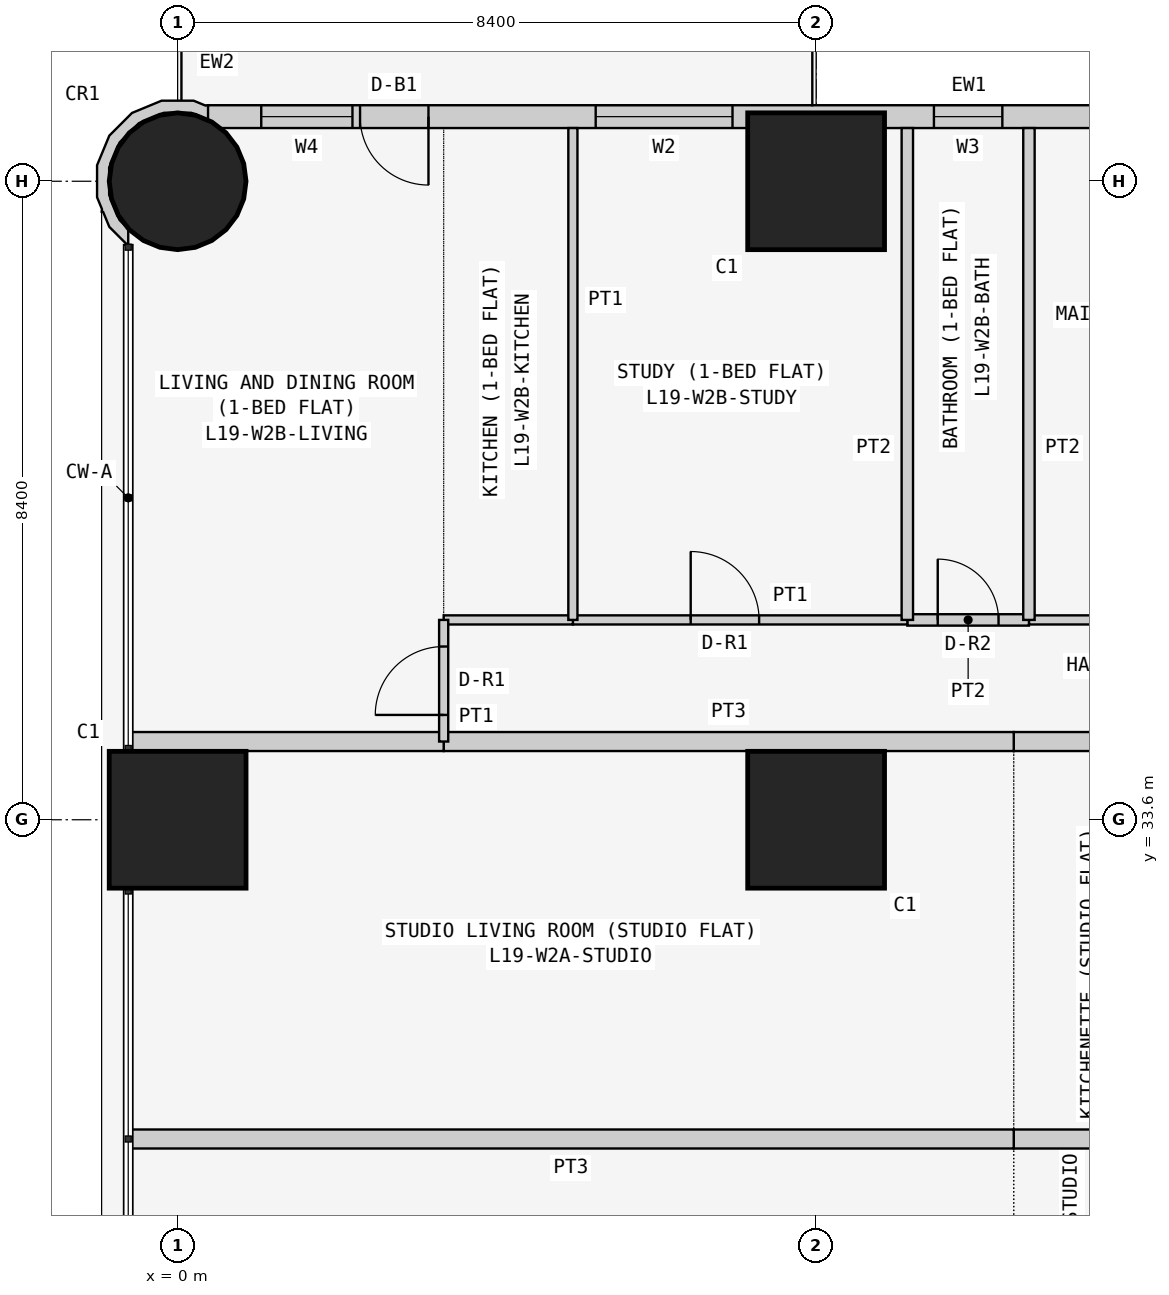
"""IFC4 building model, lengths in metres.
Left out: names, types, materials, properties, quantities, classifications, styles, units other than length and angle.
Written with IfcOpenShell. Run it as: python <this file> out.ifc"""

import sys

from ifc_helpers import new_model, si_unit, direction, frame, frame_2d, origin, origin_2d, place, context, subcontext, project, spatial, polyline, rectangle, circle, outline, extrude, element, fill, save


model = new_model("IFC4")
c1 = context("Model", 3, precision=1e-05, world=origin(), true_north=direction((0.0, 1.0)))
c2 = subcontext(c1, "Body", "Model", "MODEL_VIEW")
j1 = project(units=[si_unit("LENGTHUNIT", "METRE"), si_unit("PLANEANGLEUNIT", "RADIAN")], contexts=[c1])
p1 = place(None, origin())
s1 = spatial("IfcSite", under=j1, at=p1, CompositionType="ELEMENT")
p2 = place(p1, origin())
s2 = spatial("IfcBuilding", under=s1, at=p2, CompositionType="ELEMENT")
p3 = place(p2, frame((0.0, 0.0, 77.7)))
s3 = spatial("IfcBuildingStorey", under=s2, at=p3, CompositionType="ELEMENT", Elevation=77.7)
p4 = place(p3, frame((0.0, 33.6, 0.0), z_axis=(0.0, 0.0, 1.0), x_axis=(1.0, 0.0, 0.0)))
e1 = element("IfcColumn", 1, at=p4, inside=s3, PredefinedType="COLUMN", context=c2, shape_type="SweptSolid", body=[
    extrude(rectangle(XDim=1.8, YDim=1.8, at=origin_2d()), origin(), (0.0, 0.0, 1.0), 3.6),
])
p5 = place(p3, frame((0.0, 42.0, 0.0), z_axis=(0.0, 0.0, 1.0), x_axis=(1.0, 0.0, 0.0)))
e2 = element("IfcColumn", 2, at=p5, inside=s3, PredefinedType="COLUMN", context=c2, shape_type="SweptSolid", body=[
    extrude(circle(Radius=0.9, at=origin_2d()), origin(), (0.0, 0.0, 1.0), 3.6),
])
for number, where, z_axis, x_axis in (
    (3, (8.4, 33.6, 0.0), (0.0, 0.0, 1.0), (1.0, 0.0, 0.0)),
    (4, (8.4, 42.0, 0.0), (0.0, 0.0, 1.0), (1.0, 0.0, 0.0)),
):
    element("IfcColumn", number, at=place(p3, frame(where, z_axis=z_axis, x_axis=x_axis)), inside=s3, PredefinedType="COLUMN", context=c2, shape_type="SweptSolid", body=[
        extrude(rectangle(XDim=1.8, YDim=1.8, at=origin_2d()), origin(), (0.0, 0.0, 1.0), 3.6),
    ])
p6 = place(p3, frame((15.8, 42.85, 0.0), z_axis=(0.0, 0.0, 1.0), x_axis=(-1.0, 0.0, 0.0)))
e5 = element("IfcWall", 5, at=p6, inside=s3, PredefinedType="SOLIDWALL", context=c2, shape_type="SweptSolid", body=[
    extrude(rectangle(XDim=15.4, YDim=0.3, at=frame_2d((7.7, 0.0))), origin(), (0.0, 0.0, 1.0), 3.45),
])
p7 = place(p6, frame((1.2, 0.0, 0.9)))
e6 = element("IfcOpeningElement", 6, at=p7, cuts=e5, PredefinedType="OPENING", context=c2, shape_type="SweptSolid", body=[
    extrude(rectangle(XDim=1.8, YDim=1.5, at=frame_2d((0.9, 0.75))), frame((0.0, 0.16, 0.0), z_axis=(0.0, -1.0, 0.0), x_axis=(1.0, 0.0, 0.0)), (0.0, 0.0, 1.0), 0.32),
])
p8 = place(p6, frame((4.95, 0.0, 1.5)))
e7 = element("IfcOpeningElement", 7, at=p8, cuts=e5, PredefinedType="OPENING", context=c2, shape_type="SweptSolid", body=[
    extrude(rectangle(XDim=0.9, YDim=0.7, at=frame_2d((0.45, 0.35))), frame((0.0, 0.16, 0.0), z_axis=(0.0, -1.0, 0.0), x_axis=(1.0, 0.0, 0.0)), (0.0, 0.0, 1.0), 0.32),
])
p9 = place(p6, frame((8.5, 0.0, 0.9)))
e8 = element("IfcOpeningElement", 8, at=p9, cuts=e5, PredefinedType="OPENING", context=c2, shape_type="SweptSolid", body=[
    extrude(rectangle(XDim=1.8, YDim=1.5, at=frame_2d((0.9, 0.75))), frame((0.0, 0.16, 0.0), z_axis=(0.0, -1.0, 0.0), x_axis=(1.0, 0.0, 0.0)), (0.0, 0.0, 1.0), 0.32),
])
p10 = place(p6, frame((12.5, 0.0, 0.0)))
e9 = element("IfcOpeningElement", 9, at=p10, cuts=e5, PredefinedType="OPENING", context=c2, shape_type="SweptSolid", body=[
    extrude(rectangle(XDim=0.9, YDim=2.4, at=frame_2d((0.45, 1.2))), frame((0.0, 0.16, 0.0), z_axis=(0.0, -1.0, 0.0), x_axis=(1.0, 0.0, 0.0)), (0.0, 0.0, 1.0), 0.32),
])
p11 = place(p6, frame((13.5, 0.0, 0.9)))
e10 = element("IfcOpeningElement", 10, at=p11, cuts=e5, PredefinedType="OPENING", context=c2, shape_type="SweptSolid", body=[
    extrude(rectangle(XDim=1.2, YDim=1.5, at=frame_2d((0.6, 0.75))), frame((0.0, 0.16, 0.0), z_axis=(0.0, -1.0, 0.0), x_axis=(1.0, 0.0, 0.0)), (0.0, 0.0, 1.0), 0.32),
])
p12 = place(p3, frame((0.364, 42.91, 0.0), z_axis=(0.0, 0.0, 1.0), x_axis=(-0.926129809145, 0.377204953059, 0.0)))
e11 = element("IfcWall", 11, at=p12, inside=s3, PredefinedType="SOLIDWALL", context=c2, shape_type="SweptSolid", body=[
    extrude(outline(polyline([(0.36, 1.803), (0.509, 1.741), (0.761, 1.486), (0.896, 1.154), (0.894, 0.795), (0.755, 0.465), (0.5, 0.213), (0.168, 0.078), (-0.1, 0.08), (0.001, -0.097), (0.03, -0.08), (0.199, -0.081), (0.589, 0.078), (0.889, 0.374), (1.053, 0.763), (1.055, 1.185), (0.896, 1.575), (0.778, 1.695), (0.769, 1.728), (0.75, 1.723), (0.6, 1.875), (0.295, 2.003), (0.281, 1.998), (0.36, 1.803)])), origin(), (0.0, 0.0, 1.0), 3.45),
])
p13 = place(p3, frame((13.4, 29.4, 0.0), z_axis=(0.0, 0.0, 1.0), x_axis=(-1.0, 0.0, 0.0)))
e12 = element("IfcWall", 12, at=p13, inside=s3, PredefinedType="PARTITIONING", context=c2, shape_type="SweptSolid", body=[
    extrude(rectangle(XDim=2.4, YDim=0.25, at=frame_2d((1.2, 0.0))), origin(), (0.0, 0.0, 1.0), 3.45),
])
p14 = place(p3, frame((11.0, 29.4, 0.0), z_axis=(0.0, 0.0, 1.0), x_axis=(-1.0, 0.0, 0.0)))
e13 = element("IfcWall", 13, at=p14, inside=s3, PredefinedType="PARTITIONING", context=c2, shape_type="SweptSolid", body=[
    extrude(rectangle(XDim=11.65, YDim=0.25, at=frame_2d((5.825, 0.0))), origin(), (0.0, 0.0, 1.0), 3.45),
])
p15 = place(p3, frame((11.0, 34.629, 0.0), z_axis=(0.0, 0.0, 1.0), x_axis=(1.0, 0.0, 0.0)))
e14 = element("IfcWall", 14, at=p15, inside=s3, PredefinedType="PARTITIONING", context=c2, shape_type="SweptSolid", body=[
    extrude(rectangle(XDim=2.4, YDim=0.25, at=frame_2d((1.2, 0.0))), origin(), (0.0, 0.0, 1.0), 3.45),
])
p16 = place(p3, frame((3.5, 34.629, 0.0), z_axis=(0.0, 0.0, 1.0), x_axis=(1.0, 0.0, 0.0)))
e15 = element("IfcWall", 15, at=p16, inside=s3, PredefinedType="PARTITIONING", context=c2, shape_type="SweptSolid", body=[
    extrude(rectangle(XDim=7.5, YDim=0.25, at=frame_2d((3.75, 0.0))), origin(), (0.0, 0.0, 1.0), 3.45),
])
p17 = place(p3, frame((-0.65, 34.629, 0.0), z_axis=(0.0, 0.0, 1.0), x_axis=(1.0, 0.0, 0.0)))
e16 = element("IfcWall", 16, at=p17, inside=s3, PredefinedType="PARTITIONING", context=c2, shape_type="SweptSolid", body=[
    extrude(rectangle(XDim=4.15, YDim=0.25, at=frame_2d((2.075, 0.0))), origin(), (0.0, 0.0, 1.0), 3.45),
])
p18 = place(p3, frame((11.2, 36.229, 0.0), z_axis=(0.0, 0.0, 1.0), x_axis=(1.0, 0.0, 0.0)))
e17 = element("IfcWall", 17, at=p18, inside=s3, PredefinedType="PARTITIONING", context=c2, shape_type="SweptSolid", body=[
    extrude(rectangle(XDim=4.575, YDim=0.12, at=frame_2d((2.288, 0.0))), origin(), (0.0, 0.0, 1.0), 3.45),
])
p19 = place(p18, frame((1.85, 0.0, 0.0)))
e18 = element("IfcOpeningElement", 18, at=p19, cuts=e17, PredefinedType="OPENING", context=c2, shape_type="SweptSolid", body=[
    extrude(rectangle(XDim=0.9, YDim=2.1, at=frame_2d((0.45, 1.05))), frame((0.0, 0.07, 0.0), z_axis=(0.0, -1.0, 0.0), x_axis=(1.0, 0.0, 0.0)), (0.0, 0.0, 1.0), 0.14),
])
p20 = place(p3, frame((9.6, 36.229, 0.0), z_axis=(0.0, 0.0, 1.0), x_axis=(1.0, 0.0, 0.0)))
e19 = element("IfcWall", 19, at=p20, inside=s3, PredefinedType="PARTITIONING", context=c2, shape_type="SweptSolid", body=[
    extrude(rectangle(XDim=1.6, YDim=0.15, at=frame_2d((0.8, 0.0))), origin(), (0.0, 0.0, 1.0), 3.45),
])
p21 = place(p20, frame((0.4, 0.0, 0.0)))
e20 = element("IfcOpeningElement", 20, at=p21, cuts=e19, PredefinedType="OPENING", context=c2, shape_type="SweptSolid", body=[
    extrude(rectangle(XDim=0.8, YDim=2.1, at=frame_2d((0.4, 1.05))), frame((0.0, 0.085, 0.0), z_axis=(0.0, -1.0, 0.0), x_axis=(1.0, 0.0, 0.0)), (0.0, 0.0, 1.0), 0.17),
])
p22 = place(p3, frame((5.2, 36.229, 0.0), z_axis=(0.0, 0.0, 1.0), x_axis=(1.0, 0.0, 0.0)))
e21 = element("IfcWall", 21, at=p22, inside=s3, PredefinedType="PARTITIONING", context=c2, shape_type="SweptSolid", body=[
    extrude(rectangle(XDim=4.4, YDim=0.12, at=frame_2d((2.2, 0.0))), origin(), (0.0, 0.0, 1.0), 3.45),
])
p23 = place(p22, frame((1.55, 0.0, 0.0)))
e22 = element("IfcOpeningElement", 22, at=p23, cuts=e21, PredefinedType="OPENING", context=c2, shape_type="SweptSolid", body=[
    extrude(rectangle(XDim=0.9, YDim=2.1, at=frame_2d((0.45, 1.05))), frame((0.0, 0.07, 0.0), z_axis=(0.0, -1.0, 0.0), x_axis=(1.0, 0.0, 0.0)), (0.0, 0.0, 1.0), 0.14),
])
p24 = place(p3, frame((3.5, 36.229, 0.0), z_axis=(0.0, 0.0, 1.0), x_axis=(1.0, 0.0, 0.0)))
e23 = element("IfcWall", 23, at=p24, inside=s3, PredefinedType="PARTITIONING", context=c2, shape_type="SweptSolid", body=[
    extrude(rectangle(XDim=1.7, YDim=0.12, at=frame_2d((0.85, 0.0))), origin(), (0.0, 0.0, 1.0), 3.45),
])
p25 = place(p3, frame((3.5, 34.629, 0.0), z_axis=(0.0, 0.0, 1.0), x_axis=(0.0, 1.0, 0.0)))
e24 = element("IfcWall", 24, at=p25, inside=s3, PredefinedType="PARTITIONING", context=c2, shape_type="SweptSolid", body=[
    extrude(rectangle(XDim=1.6, YDim=0.12, at=frame_2d((0.8, 0.0))), origin(), (0.0, 0.0, 1.0), 3.45),
])
p26 = place(p25, frame((0.35, 0.0, 0.0)))
e25 = element("IfcOpeningElement", 25, at=p26, cuts=e24, PredefinedType="OPENING", context=c2, shape_type="SweptSolid", body=[
    extrude(rectangle(XDim=0.9, YDim=2.1, at=frame_2d((0.45, 1.05))), frame((0.0, 0.07, 0.0), z_axis=(0.0, -1.0, 0.0), x_axis=(1.0, 0.0, 0.0)), (0.0, 0.0, 1.0), 0.14),
])
for number, where, z_axis, x_axis in (
    (26, (11.2, 36.229, 0.0), (0.0, 0.0, 1.0), (0.0, 1.0, 0.0)),
    (27, (9.6, 36.229, 0.0), (0.0, 0.0, 1.0), (0.0, 1.0, 0.0)),
):
    element("IfcWall", number, at=place(p3, frame(where, z_axis=z_axis, x_axis=x_axis)), inside=s3, PredefinedType="PARTITIONING", context=c2, shape_type="SweptSolid", body=[
        extrude(rectangle(XDim=6.471, YDim=0.15, at=frame_2d((3.235, 0.0))), origin(), (0.0, 0.0, 1.0), 3.45),
    ])
p27 = place(p3, frame((5.2, 36.229, 0.0), z_axis=(0.0, 0.0, 1.0), x_axis=(0.0, 1.0, 0.0)))
e28 = element("IfcWall", 28, at=p27, inside=s3, PredefinedType="PARTITIONING", context=c2, shape_type="SweptSolid", body=[
    extrude(rectangle(XDim=6.471, YDim=0.12, at=frame_2d((3.235, 0.0))), origin(), (0.0, 0.0, 1.0), 3.45),
])
p28 = place(p8, origin())
e29 = element("IfcWindow", 29, at=p28, inside=s3, PartitioningType="SINGLE_PANEL", PredefinedType="WINDOW", context=c2, shape_type="SweptSolid", body=[
    extrude(rectangle(XDim=0.9, YDim=0.7, at=frame_2d((0.45, 0.35))), frame((0.0, 0.03, 0.0), z_axis=(0.0, -1.0, 0.0), x_axis=(1.0, 0.0, 0.0)), (0.0, 0.0, 1.0), 0.06),
])
fill(e7, e29)
p29 = place(p9, origin())
e30 = element("IfcWindow", 30, at=p29, inside=s3, PartitioningType="SINGLE_PANEL", PredefinedType="WINDOW", context=c2, shape_type="SweptSolid", body=[
    extrude(rectangle(XDim=1.8, YDim=1.5, at=frame_2d((0.9, 0.75))), frame((0.0, 0.03, 0.0), z_axis=(0.0, -1.0, 0.0), x_axis=(1.0, 0.0, 0.0)), (0.0, 0.0, 1.0), 0.06),
])
fill(e8, e30)
p30 = place(p10, origin())
e31 = element("IfcDoor", 31, at=p30, inside=s3, OperationType="SINGLE_SWING_LEFT", PredefinedType="DOOR", context=c2, shape_type="SweptSolid", body=[
    extrude(rectangle(XDim=0.9, YDim=2.4, at=frame_2d((0.45, 1.2))), frame((0.0, 0.025, 0.0), z_axis=(0.0, -1.0, 0.0), x_axis=(1.0, 0.0, 0.0)), (0.0, 0.0, 1.0), 0.05),
])
fill(e9, e31)
p31 = place(p11, origin())
e32 = element("IfcWindow", 32, at=p31, inside=s3, PartitioningType="SINGLE_PANEL", PredefinedType="WINDOW", context=c2, shape_type="SweptSolid", body=[
    extrude(rectangle(XDim=1.2, YDim=1.5, at=frame_2d((0.6, 0.75))), frame((0.0, 0.03, 0.0), z_axis=(0.0, -1.0, 0.0), x_axis=(1.0, 0.0, 0.0)), (0.0, 0.0, 1.0), 0.06),
])
fill(e10, e32)
p32 = place(p21, origin())
e33 = element("IfcDoor", 33, at=p32, inside=s3, OperationType="SINGLE_SWING_LEFT", PredefinedType="DOOR", context=c2, shape_type="SweptSolid", body=[
    extrude(rectangle(XDim=0.8, YDim=2.1, at=frame_2d((0.4, 1.05))), frame((0.0, 0.025, 0.0), z_axis=(0.0, -1.0, 0.0), x_axis=(1.0, 0.0, 0.0)), (0.0, 0.0, 1.0), 0.05),
])
fill(e20, e33)
p33 = place(p23, origin())
e34 = element("IfcDoor", 34, at=p33, inside=s3, OperationType="SINGLE_SWING_LEFT", PredefinedType="DOOR", context=c2, shape_type="SweptSolid", body=[
    extrude(rectangle(XDim=0.9, YDim=2.1, at=frame_2d((0.45, 1.05))), frame((0.0, 0.025, 0.0), z_axis=(0.0, -1.0, 0.0), x_axis=(1.0, 0.0, 0.0)), (0.0, 0.0, 1.0), 0.05),
])
fill(e22, e34)
p34 = place(p26, origin())
e35 = element("IfcDoor", 35, at=p34, inside=s3, OperationType="SINGLE_SWING_LEFT", PredefinedType="DOOR", context=c2, shape_type="SweptSolid", body=[
    extrude(rectangle(XDim=0.9, YDim=2.1, at=frame_2d((0.45, 1.05))), frame((0.0, 0.025, 0.0), z_axis=(0.0, -1.0, 0.0), x_axis=(1.0, 0.0, 0.0)), (0.0, 0.0, 1.0), 0.05),
])
fill(e25, e35)
save(model, sys.argv[1])
